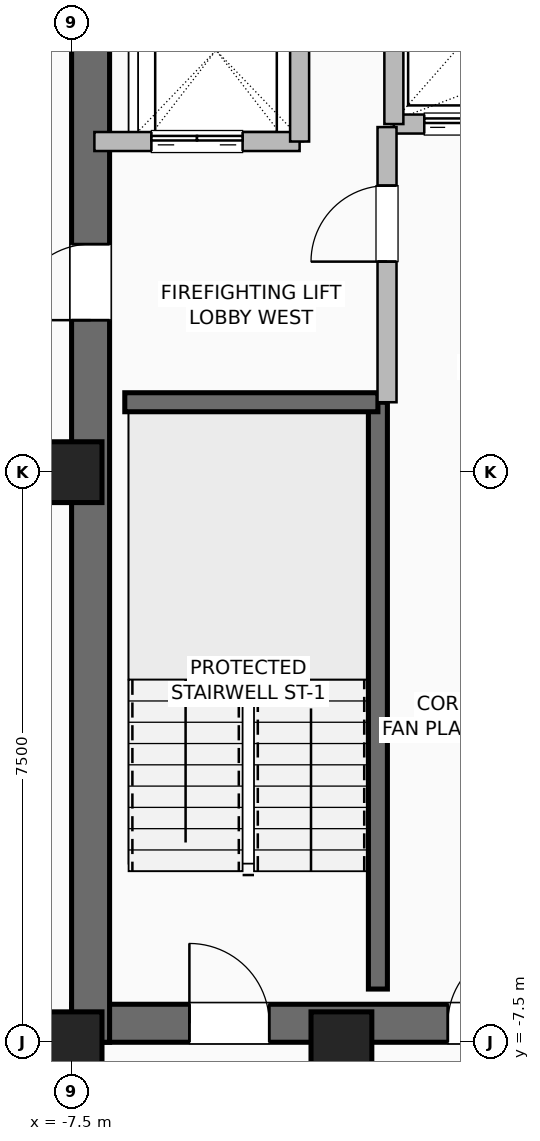
"""IFC4 building model, lengths in metres.
Left out: names, types, materials, properties, quantities, classifications, styles, units other than length and angle.
Written with IfcOpenShell. Run it as: python <this file> out.ifc"""

import sys

from ifc_helpers import new_model, si_unit, direction, frame, frame_2d, origin, origin_2d, place, context, subcontext, project, spatial, rectangle, hollow_rectangle, extrude, element, fill, save


model = new_model("IFC4")
c1 = context("Model", 3, precision=1e-05, world=origin(), true_north=direction((0.0, 1.0)))
c2 = subcontext(c1, "Body", "Model", "MODEL_VIEW")
j1 = project(units=[si_unit("LENGTHUNIT", "METRE"), si_unit("PLANEANGLEUNIT", "RADIAN")], contexts=[c1])
p1 = place(None, origin())
s1 = spatial("IfcSite", under=j1, at=p1, CompositionType="ELEMENT")
p2 = place(p1, origin())
s2 = spatial("IfcBuilding", under=s1, at=p2, CompositionType="ELEMENT")
p3 = place(p2, frame((0.0, 0.0, 236.0)))
s3 = spatial("IfcBuildingStorey", under=s2, at=p3, CompositionType="ELEMENT", Elevation=236.0)
for number, where, z_axis, x_axis in (
    (1, (-7.5, -7.5, 0.0), (0.0, 0.0, 1.0), (1.0, 0.0, 0.0)),
    (2, (-3.95, -7.5, 0.0), (0.0, 0.0, 1.0), (1.0, 0.0, 0.0)),
    (3, (-7.5, 0.0, 0.0), (0.0, 0.0, 1.0), (1.0, 0.0, 0.0)),
):
    element("IfcColumn", number, at=place(p3, frame(where, z_axis=z_axis, x_axis=x_axis)), inside=s3, PredefinedType="COLUMN", context=c2, shape_type="SweptSolid", body=[
        extrude(hollow_rectangle(XDim=0.8, YDim=0.8, WallThickness=0.04, at=origin_2d()), origin(), (0.0, 0.0, 1.0), 3.6),
    ])
p4 = place(p3, frame((-7.5, -7.25, 0.0), z_axis=(0.0, 0.0, 1.0), x_axis=(1.0, 0.0, 0.0)))
e4 = element("IfcWall", 4, at=p4, inside=s3, PredefinedType="SHEAR", context=c2, shape_type="SweptSolid", body=[
    extrude(rectangle(XDim=15.0, YDim=0.5, at=frame_2d((7.5, 0.0))), origin(), (0.0, 0.0, 1.0), 3.36),
])
p5 = place(p4, frame((1.55, 0.0, 0.0)))
e5 = element("IfcOpeningElement", 5, at=p5, cuts=e4, PredefinedType="OPENING", context=c2, shape_type="SweptSolid", body=[
    extrude(rectangle(XDim=1.05, YDim=2.08, at=frame_2d((0.525, 1.04))), frame((0.0, 0.26, 0.0), z_axis=(0.0, -1.0, 0.0), x_axis=(1.0, 0.0, 0.0)), (0.0, 0.0, 1.0), 0.52),
])
p6 = place(p4, frame((12.4, 0.0, 0.0)))
e6 = element("IfcOpeningElement", 6, at=p6, cuts=e4, PredefinedType="OPENING", context=c2, shape_type="SweptSolid", body=[
    extrude(rectangle(XDim=1.05, YDim=2.08, at=frame_2d((0.525, 1.04))), frame((0.0, 0.26, 0.0), z_axis=(0.0, -1.0, 0.0), x_axis=(1.0, 0.0, 0.0)), (0.0, 0.0, 1.0), 0.52),
])
p7 = place(p4, frame((4.95, 0.0, 0.0)))
e7 = element("IfcOpeningElement", 7, at=p7, cuts=e4, PredefinedType="OPENING", context=c2, shape_type="SweptSolid", body=[
    extrude(rectangle(XDim=1.0, YDim=2.08, at=frame_2d((0.5, 1.04))), frame((0.0, 0.26, 0.0), z_axis=(0.0, -1.0, 0.0), x_axis=(1.0, 0.0, 0.0)), (0.0, 0.0, 1.0), 0.52),
])
p8 = place(p4, frame((7.05, 0.0, 0.0)))
e8 = element("IfcOpeningElement", 8, at=p8, cuts=e4, PredefinedType="OPENING", context=c2, shape_type="SweptSolid", body=[
    extrude(rectangle(XDim=1.0, YDim=2.08, at=frame_2d((0.5, 1.04))), frame((0.0, 0.26, 0.0), z_axis=(0.0, -1.0, 0.0), x_axis=(1.0, 0.0, 0.0)), (0.0, 0.0, 1.0), 0.52),
])
p9 = place(p4, frame((9.15, 0.0, 0.0)))
e9 = element("IfcOpeningElement", 9, at=p9, cuts=e4, PredefinedType="OPENING", context=c2, shape_type="SweptSolid", body=[
    extrude(rectangle(XDim=1.0, YDim=2.08, at=frame_2d((0.5, 1.04))), frame((0.0, 0.26, 0.0), z_axis=(0.0, -1.0, 0.0), x_axis=(1.0, 0.0, 0.0)), (0.0, 0.0, 1.0), 0.52),
])
p10 = place(p3, frame((-7.25, -7.5, 0.0), z_axis=(0.0, 0.0, 1.0), x_axis=(0.0, 1.0, 0.0)))
e10 = element("IfcWall", 10, at=p10, inside=s3, PredefinedType="SHEAR", context=c2, shape_type="SweptSolid", body=[
    extrude(rectangle(XDim=15.0, YDim=0.5, at=frame_2d((7.5, 0.0))), origin(), (0.0, 0.0, 1.0), 3.36),
])
p11 = place(p10, frame((9.5, 0.0, 0.0)))
e11 = element("IfcOpeningElement", 11, at=p11, cuts=e10, PredefinedType="OPENING", context=c2, shape_type="SweptSolid", body=[
    extrude(rectangle(XDim=1.0, YDim=2.08, at=frame_2d((0.5, 1.04))), frame((0.0, 0.26, 0.0), z_axis=(0.0, -1.0, 0.0), x_axis=(1.0, 0.0, 0.0)), (0.0, 0.0, 1.0), 0.52),
])
p12 = place(p3, frame((-3.47, -6.8, 0.0), z_axis=(0.0, 0.0, 1.0), x_axis=(0.0, 1.0, 0.0)))
e12 = element("IfcWall", 12, at=p12, inside=s3, PredefinedType="SHEAR", context=c2, shape_type="SweptSolid", body=[
    extrude(rectangle(XDim=7.72, YDim=0.25, at=frame_2d((3.86, 0.0))), origin(), (0.0, 0.0, 1.0), 3.36),
])
p13 = place(p3, frame((-6.8, 0.92, 0.0), z_axis=(0.0, 0.0, 1.0), x_axis=(1.0, 0.0, 0.0)))
e13 = element("IfcWall", 13, at=p13, inside=s3, PredefinedType="SHEAR", context=c2, shape_type="SweptSolid", body=[
    extrude(rectangle(XDim=3.33, YDim=0.25, at=frame_2d((1.665, 0.0))), origin(), (0.0, 0.0, 1.0), 3.36),
])
p14 = place(p3, frame((-3.26, 4.58, 0.0), z_axis=(0.0, 0.0, 1.0), x_axis=(1.0, 0.0, 0.0)))
e14 = element("IfcWall", 14, at=p14, inside=s3, PredefinedType="SHEAR", context=c2, shape_type="SweptSolid", body=[
    extrude(rectangle(XDim=5.64, YDim=0.25, at=frame_2d((2.82, 0.0))), origin(), (0.0, 0.0, 1.0), 3.36),
])
p15 = place(p14, frame((0.4, 0.0, 0.0)))
e15 = element("IfcOpeningElement", 15, at=p15, cuts=e14, PredefinedType="OPENING", context=c2, shape_type="SweptSolid", body=[
    extrude(rectangle(XDim=1.1, YDim=2.2, at=frame_2d((0.55, 1.1))), frame((0.0, 0.135, 0.0), z_axis=(0.0, -1.0, 0.0), x_axis=(1.0, 0.0, 0.0)), (0.0, 0.0, 1.0), 0.27),
])
p16 = place(p14, frame((2.28, 0.0, 0.0)))
e16 = element("IfcOpeningElement", 16, at=p16, cuts=e14, PredefinedType="OPENING", context=c2, shape_type="SweptSolid", body=[
    extrude(rectangle(XDim=1.1, YDim=2.2, at=frame_2d((0.55, 1.1))), frame((0.0, 0.135, 0.0), z_axis=(0.0, -1.0, 0.0), x_axis=(1.0, 0.0, 0.0)), (0.0, 0.0, 1.0), 0.27),
])
p17 = place(p14, frame((4.16, 0.0, 0.0)))
e17 = element("IfcOpeningElement", 17, at=p17, cuts=e14, PredefinedType="OPENING", context=c2, shape_type="SweptSolid", body=[
    extrude(rectangle(XDim=1.1, YDim=2.2, at=frame_2d((0.55, 1.1))), frame((0.0, 0.135, 0.0), z_axis=(0.0, -1.0, 0.0), x_axis=(1.0, 0.0, 0.0)), (0.0, 0.0, 1.0), 0.27),
])
p18 = place(p3, frame((-3.26, 4.58, 0.0), z_axis=(0.0, 0.0, 1.0), x_axis=(0.0, 1.0, 0.0)))
e18 = element("IfcWall", 18, at=p18, inside=s3, PredefinedType="SHEAR", context=c2, shape_type="SweptSolid", body=[
    extrude(rectangle(XDim=2.22, YDim=0.25, at=frame_2d((1.11, 0.0))), origin(), (0.0, 0.0, 1.0), 3.36),
])
p19 = place(p3, frame((-7.2, 4.35, 0.0), z_axis=(0.0, 0.0, 1.0), x_axis=(1.0, 0.0, 0.0)))
e19 = element("IfcWall", 19, at=p19, inside=s3, PredefinedType="SHEAR", context=c2, shape_type="SweptSolid", body=[
    extrude(rectangle(XDim=2.7, YDim=0.25, at=frame_2d((1.35, 0.0))), origin(), (0.0, 0.0, 1.0), 3.36),
])
p20 = place(p19, frame((0.75, 0.0, 0.0)))
e20 = element("IfcOpeningElement", 20, at=p20, cuts=e19, PredefinedType="OPENING", context=c2, shape_type="SweptSolid", body=[
    extrude(rectangle(XDim=1.2, YDim=2.2, at=frame_2d((0.6, 1.1))), frame((0.0, 0.135, 0.0), z_axis=(0.0, -1.0, 0.0), x_axis=(1.0, 0.0, 0.0)), (0.0, 0.0, 1.0), 0.27),
])
p21 = place(p3, frame((-4.5, 4.35, 0.0), z_axis=(0.0, 0.0, 1.0), x_axis=(0.0, 1.0, 0.0)))
e21 = element("IfcWall", 21, at=p21, inside=s3, PredefinedType="SHEAR", context=c2, shape_type="SweptSolid", body=[
    extrude(rectangle(XDim=2.85, YDim=0.25, at=frame_2d((1.425, 0.0))), origin(), (0.0, 0.0, 1.0), 3.36),
])
p22 = place(p3, frame((-3.35, 0.92, 0.0), z_axis=(0.0, 0.0, 1.0), x_axis=(0.0, 1.0, 0.0)))
e22 = element("IfcWall", 22, at=p22, inside=s3, PredefinedType="SHEAR", context=c2, shape_type="SweptSolid", body=[
    extrude(rectangle(XDim=3.62, YDim=0.25, at=frame_2d((1.81, 0.0))), origin(), (0.0, 0.0, 1.0), 3.36),
])
p23 = place(p22, frame((1.85, 0.0, 0.0)))
e23 = element("IfcOpeningElement", 23, at=p23, cuts=e22, PredefinedType="OPENING", context=c2, shape_type="SweptSolid", body=[
    extrude(rectangle(XDim=1.0, YDim=2.08, at=frame_2d((0.5, 1.04))), frame((0.0, 0.135, 0.0), z_axis=(0.0, -1.0, 0.0), x_axis=(1.0, 0.0, 0.0)), (0.0, 0.0, 1.0), 0.27),
])
p24 = place(p5, origin())
e24 = element("IfcDoor", 24, at=p24, inside=s3, OperationType="SINGLE_SWING_LEFT", PredefinedType="DOOR", context=c2, shape_type="SweptSolid", body=[
    extrude(rectangle(XDim=1.05, YDim=2.08, at=frame_2d((0.525, 1.04))), frame((0.0, 0.025, 0.0), z_axis=(0.0, -1.0, 0.0), x_axis=(1.0, 0.0, 0.0)), (0.0, 0.0, 1.0), 0.05),
])
fill(e5, e24)
p25 = place(p11, origin())
e25 = element("IfcDoor", 25, at=p25, inside=s3, OperationType="SINGLE_SWING_LEFT", PredefinedType="DOOR", context=c2, shape_type="SweptSolid", body=[
    extrude(rectangle(XDim=1.0, YDim=2.08, at=frame_2d((0.5, 1.04))), frame((0.0, 0.025, 0.0), z_axis=(0.0, -1.0, 0.0), x_axis=(1.0, 0.0, 0.0)), (0.0, 0.0, 1.0), 0.05),
])
fill(e11, e25)
p26 = place(p7, origin())
e26 = element("IfcDoor", 26, at=p26, inside=s3, OperationType="SINGLE_SWING_RIGHT", PredefinedType="DOOR", context=c2, shape_type="SweptSolid", body=[
    extrude(rectangle(XDim=1.0, YDim=2.08, at=frame_2d((0.5, 1.04))), frame((0.0, 0.025, 0.0), z_axis=(0.0, -1.0, 0.0), x_axis=(1.0, 0.0, 0.0)), (0.0, 0.0, 1.0), 0.05),
])
fill(e7, e26)
p27 = place(p15, origin())
e27 = element("IfcDoor", 27, at=p27, inside=s3, OperationType="DOUBLE_DOOR_SLIDING", PredefinedType="DOOR", context=c2, shape_type="SweptSolid", body=[
    extrude(rectangle(XDim=1.1, YDim=2.2, at=frame_2d((0.55, 1.1))), frame((0.0, 0.025, 0.0), z_axis=(0.0, -1.0, 0.0), x_axis=(1.0, 0.0, 0.0)), (0.0, 0.0, 1.0), 0.05),
])
fill(e15, e27)
p28 = place(p20, origin())
e28 = element("IfcDoor", 28, at=p28, inside=s3, OperationType="DOUBLE_DOOR_SLIDING", PredefinedType="DOOR", context=c2, shape_type="SweptSolid", body=[
    extrude(rectangle(XDim=1.2, YDim=2.2, at=frame_2d((0.6, 1.1))), frame((0.0, 0.025, 0.0), z_axis=(0.0, -1.0, 0.0), x_axis=(1.0, 0.0, 0.0)), (0.0, 0.0, 1.0), 0.05),
])
fill(e20, e28)
p29 = place(p23, origin())
e29 = element("IfcDoor", 29, at=p29, inside=s3, OperationType="SINGLE_SWING_LEFT", PredefinedType="DOOR", context=c2, shape_type="SweptSolid", body=[
    extrude(rectangle(XDim=1.0, YDim=2.08, at=frame_2d((0.5, 1.04))), frame((0.0, 0.025, 0.0), z_axis=(0.0, -1.0, 0.0), x_axis=(1.0, 0.0, 0.0)), (0.0, 0.0, 1.0), 0.05),
])
fill(e23, e29)
save(model, sys.argv[1])
